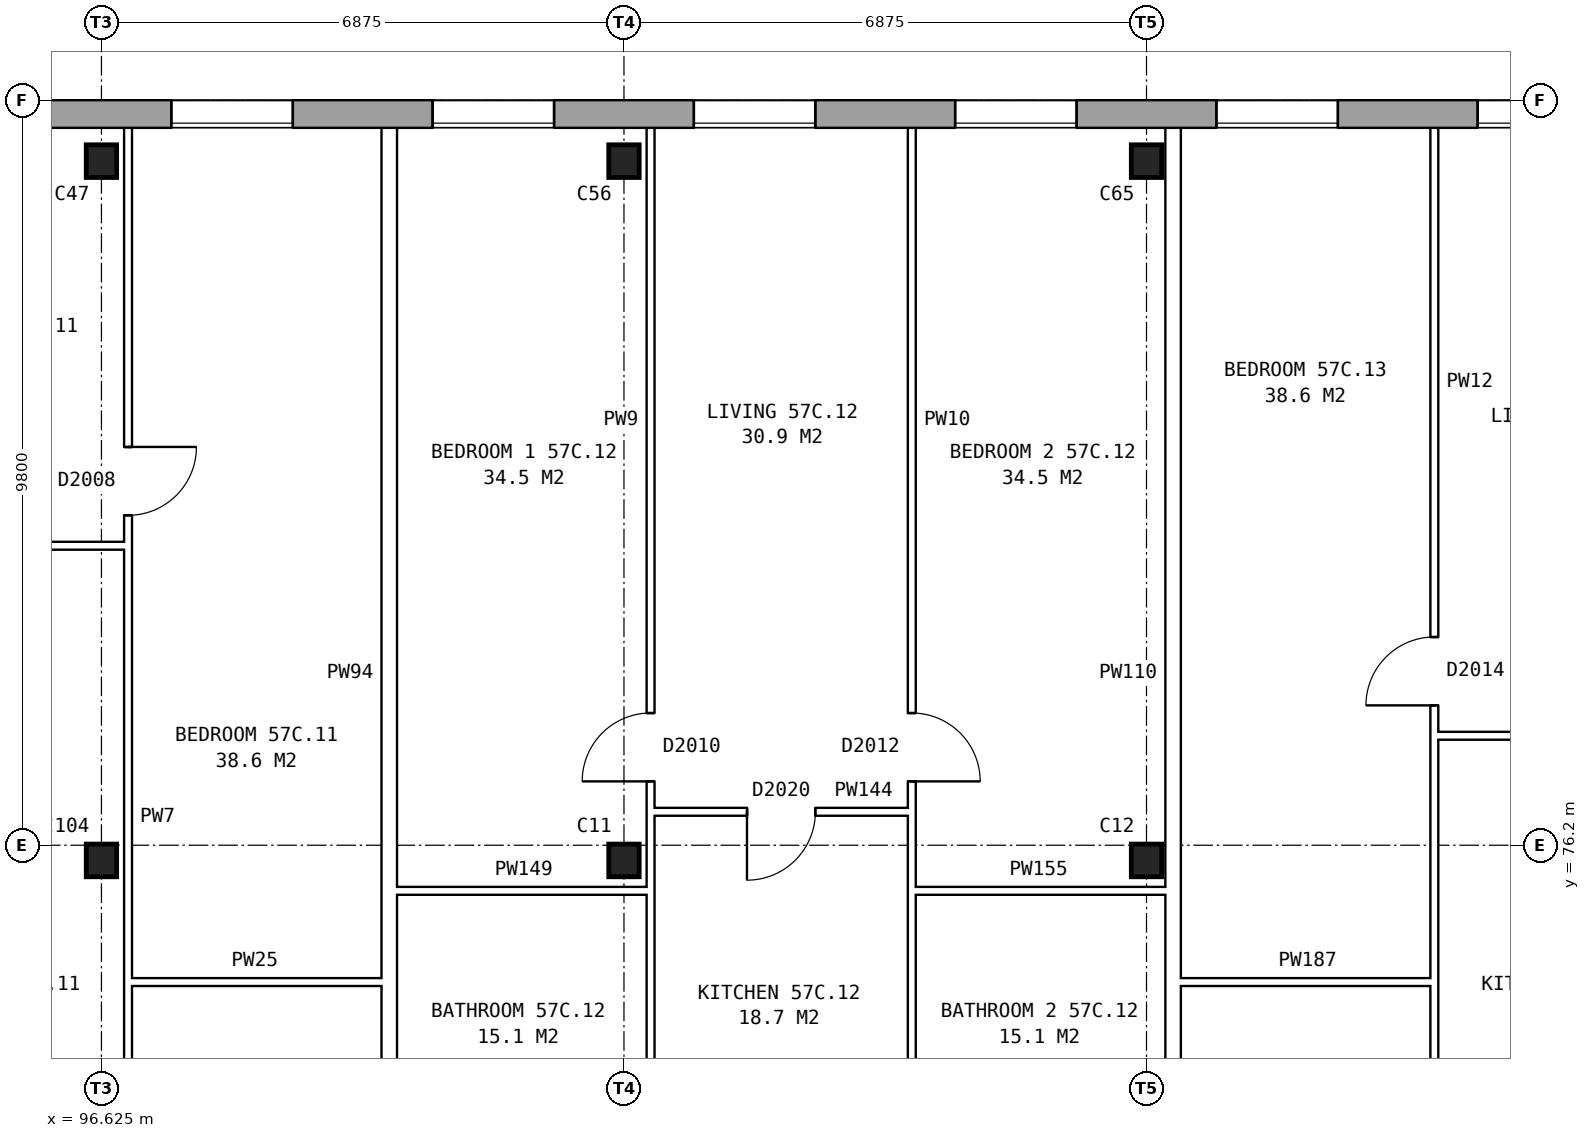
"""IFC4 building model, lengths in metres.
Left out: names, types, materials, properties, quantities, classifications, styles, units other than length and angle.
Written with IfcOpenShell. Run it as: python <this file> out.ifc"""

import sys

from ifc_helpers import new_model, si_unit, direction, frame, frame_2d, origin, origin_2d, place, context, subcontext, project, spatial, rectangle, i_section, extrude, element, fill, save


model = new_model("IFC4")
c1 = context("Model", 3, precision=1e-05, world=origin(), true_north=direction((0.0, 1.0)))
c2 = subcontext(c1, "Body", "Model", "MODEL_VIEW")
j1 = project(units=[si_unit("LENGTHUNIT", "METRE"), si_unit("PLANEANGLEUNIT", "RADIAN")], contexts=[c1])
p1 = place(None, origin())
s1 = spatial("IfcSite", under=j1, at=p1, CompositionType="ELEMENT")
p2 = place(p1, origin())
s2 = spatial("IfcBuilding", under=s1, at=p2, CompositionType="ELEMENT")
p3 = place(p2, frame((0.0, 0.0, 202.8)))
s3 = spatial("IfcBuildingStorey", under=s2, at=p3, CompositionType="ELEMENT", Elevation=202.8)
for number, where, z_axis, x_axis in (
    (1, (96.625, 76.0, 0.0), (0.0, 0.0, 1.0), (1.0, 0.0, 0.0)),
    (2, (103.5, 76.0, 0.0), (0.0, 0.0, 1.0), (1.0, 0.0, 0.0)),
    (3, (110.375, 76.0, 0.0), (0.0, 0.0, 1.0), (1.0, 0.0, 0.0)),
    (4, (96.625, 85.2, 0.0), (0.0, 0.0, 1.0), (1.0, 0.0, 0.0)),
    (5, (103.5, 85.2, 0.0), (0.0, 0.0, 1.0), (1.0, 0.0, 0.0)),
    (6, (110.375, 85.2, 0.0), (0.0, 0.0, 1.0), (1.0, 0.0, 0.0)),
):
    element("IfcColumn", number, at=place(p3, frame(where, z_axis=z_axis, x_axis=x_axis)), inside=s3, PredefinedType="COLUMN", context=c2, shape_type="SweptSolid", body=[
        extrude(i_section(OverallWidth=0.4, OverallDepth=0.43, WebThickness=0.04, FlangeThickness=0.04, at=origin_2d()), origin(), (0.0, 0.0, 1.0), 2.85),
    ])
p4 = place(p3, frame((131.05, 85.82, 0.0), z_axis=(0.0, 0.0, 1.0), x_axis=(-1.0, 0.0, 0.0)))
e7 = element("IfcWall", 7, at=p4, inside=s3, PredefinedType="STANDARD", context=c2, shape_type="SweptSolid", body=[
    extrude(rectangle(XDim=55.1, YDim=0.36, at=frame_2d((27.55, 0.0))), origin(), (0.0, 0.0, 1.0), 2.85),
])
p5 = place(p4, frame((0.969, 0.0, 0.8)))
e8 = element("IfcOpeningElement", 8, at=p5, cuts=e7, PredefinedType="OPENING", context=c2, shape_type="SweptSolid", body=[
    extrude(rectangle(XDim=1.6, YDim=1.8, at=frame_2d((0.8, 0.9))), frame((0.0, 0.19, 0.0), z_axis=(0.0, -1.0, 0.0), x_axis=(1.0, 0.0, 0.0)), (0.0, 0.0, 1.0), 0.38),
])
p6 = place(p4, frame((4.406, 0.0, 0.8)))
e9 = element("IfcOpeningElement", 9, at=p6, cuts=e7, PredefinedType="OPENING", context=c2, shape_type="SweptSolid", body=[
    extrude(rectangle(XDim=1.6, YDim=1.8, at=frame_2d((0.8, 0.9))), frame((0.0, 0.19, 0.0), z_axis=(0.0, -1.0, 0.0), x_axis=(1.0, 0.0, 0.0)), (0.0, 0.0, 1.0), 0.38),
])
p7 = place(p4, frame((7.844, 0.0, 0.8)))
e10 = element("IfcOpeningElement", 10, at=p7, cuts=e7, PredefinedType="OPENING", context=c2, shape_type="SweptSolid", body=[
    extrude(rectangle(XDim=1.6, YDim=1.8, at=frame_2d((0.8, 0.9))), frame((0.0, 0.19, 0.0), z_axis=(0.0, -1.0, 0.0), x_axis=(1.0, 0.0, 0.0)), (0.0, 0.0, 1.0), 0.38),
])
p8 = place(p4, frame((11.281, 0.0, 0.8)))
e11 = element("IfcOpeningElement", 11, at=p8, cuts=e7, PredefinedType="OPENING", context=c2, shape_type="SweptSolid", body=[
    extrude(rectangle(XDim=1.6, YDim=1.8, at=frame_2d((0.8, 0.9))), frame((0.0, 0.19, 0.0), z_axis=(0.0, -1.0, 0.0), x_axis=(1.0, 0.0, 0.0)), (0.0, 0.0, 1.0), 0.38),
])
p9 = place(p4, frame((14.719, 0.0, 0.8)))
e12 = element("IfcOpeningElement", 12, at=p9, cuts=e7, PredefinedType="OPENING", context=c2, shape_type="SweptSolid", body=[
    extrude(rectangle(XDim=1.6, YDim=1.8, at=frame_2d((0.8, 0.9))), frame((0.0, 0.19, 0.0), z_axis=(0.0, -1.0, 0.0), x_axis=(1.0, 0.0, 0.0)), (0.0, 0.0, 1.0), 0.38),
])
p10 = place(p4, frame((18.156, 0.0, 0.8)))
e13 = element("IfcOpeningElement", 13, at=p10, cuts=e7, PredefinedType="OPENING", context=c2, shape_type="SweptSolid", body=[
    extrude(rectangle(XDim=1.6, YDim=1.8, at=frame_2d((0.8, 0.9))), frame((0.0, 0.19, 0.0), z_axis=(0.0, -1.0, 0.0), x_axis=(1.0, 0.0, 0.0)), (0.0, 0.0, 1.0), 0.38),
])
p11 = place(p4, frame((21.594, 0.0, 0.8)))
e14 = element("IfcOpeningElement", 14, at=p11, cuts=e7, PredefinedType="OPENING", context=c2, shape_type="SweptSolid", body=[
    extrude(rectangle(XDim=1.6, YDim=1.8, at=frame_2d((0.8, 0.9))), frame((0.0, 0.19, 0.0), z_axis=(0.0, -1.0, 0.0), x_axis=(1.0, 0.0, 0.0)), (0.0, 0.0, 1.0), 0.38),
])
p12 = place(p4, frame((25.031, 0.0, 0.8)))
e15 = element("IfcOpeningElement", 15, at=p12, cuts=e7, PredefinedType="OPENING", context=c2, shape_type="SweptSolid", body=[
    extrude(rectangle(XDim=1.6, YDim=1.8, at=frame_2d((0.8, 0.9))), frame((0.0, 0.19, 0.0), z_axis=(0.0, -1.0, 0.0), x_axis=(1.0, 0.0, 0.0)), (0.0, 0.0, 1.0), 0.38),
])
p13 = place(p4, frame((28.469, 0.0, 0.8)))
e16 = element("IfcOpeningElement", 16, at=p13, cuts=e7, PredefinedType="OPENING", context=c2, shape_type="SweptSolid", body=[
    extrude(rectangle(XDim=1.6, YDim=1.8, at=frame_2d((0.8, 0.9))), frame((0.0, 0.19, 0.0), z_axis=(0.0, -1.0, 0.0), x_axis=(1.0, 0.0, 0.0)), (0.0, 0.0, 1.0), 0.38),
])
p14 = place(p4, frame((31.906, 0.0, 0.8)))
e17 = element("IfcOpeningElement", 17, at=p14, cuts=e7, PredefinedType="OPENING", context=c2, shape_type="SweptSolid", body=[
    extrude(rectangle(XDim=1.6, YDim=1.8, at=frame_2d((0.8, 0.9))), frame((0.0, 0.19, 0.0), z_axis=(0.0, -1.0, 0.0), x_axis=(1.0, 0.0, 0.0)), (0.0, 0.0, 1.0), 0.38),
])
p15 = place(p4, frame((35.344, 0.0, 0.8)))
e18 = element("IfcOpeningElement", 18, at=p15, cuts=e7, PredefinedType="OPENING", context=c2, shape_type="SweptSolid", body=[
    extrude(rectangle(XDim=1.6, YDim=1.8, at=frame_2d((0.8, 0.9))), frame((0.0, 0.19, 0.0), z_axis=(0.0, -1.0, 0.0), x_axis=(1.0, 0.0, 0.0)), (0.0, 0.0, 1.0), 0.38),
])
p16 = place(p4, frame((38.781, 0.0, 0.8)))
e19 = element("IfcOpeningElement", 19, at=p16, cuts=e7, PredefinedType="OPENING", context=c2, shape_type="SweptSolid", body=[
    extrude(rectangle(XDim=1.6, YDim=1.8, at=frame_2d((0.8, 0.9))), frame((0.0, 0.19, 0.0), z_axis=(0.0, -1.0, 0.0), x_axis=(1.0, 0.0, 0.0)), (0.0, 0.0, 1.0), 0.38),
])
p17 = place(p4, frame((42.219, 0.0, 0.8)))
e20 = element("IfcOpeningElement", 20, at=p17, cuts=e7, PredefinedType="OPENING", context=c2, shape_type="SweptSolid", body=[
    extrude(rectangle(XDim=1.6, YDim=1.8, at=frame_2d((0.8, 0.9))), frame((0.0, 0.19, 0.0), z_axis=(0.0, -1.0, 0.0), x_axis=(1.0, 0.0, 0.0)), (0.0, 0.0, 1.0), 0.38),
])
p18 = place(p4, frame((45.656, 0.0, 0.8)))
e21 = element("IfcOpeningElement", 21, at=p18, cuts=e7, PredefinedType="OPENING", context=c2, shape_type="SweptSolid", body=[
    extrude(rectangle(XDim=1.6, YDim=1.8, at=frame_2d((0.8, 0.9))), frame((0.0, 0.19, 0.0), z_axis=(0.0, -1.0, 0.0), x_axis=(1.0, 0.0, 0.0)), (0.0, 0.0, 1.0), 0.38),
])
p19 = place(p4, frame((49.094, 0.0, 0.8)))
e22 = element("IfcOpeningElement", 22, at=p19, cuts=e7, PredefinedType="OPENING", context=c2, shape_type="SweptSolid", body=[
    extrude(rectangle(XDim=1.6, YDim=1.8, at=frame_2d((0.8, 0.9))), frame((0.0, 0.19, 0.0), z_axis=(0.0, -1.0, 0.0), x_axis=(1.0, 0.0, 0.0)), (0.0, 0.0, 1.0), 0.38),
])
p20 = place(p4, frame((52.531, 0.0, 0.8)))
e23 = element("IfcOpeningElement", 23, at=p20, cuts=e7, PredefinedType="OPENING", context=c2, shape_type="SweptSolid", body=[
    extrude(rectangle(XDim=1.6, YDim=1.8, at=frame_2d((0.8, 0.9))), frame((0.0, 0.19, 0.0), z_axis=(0.0, -1.0, 0.0), x_axis=(1.0, 0.0, 0.0)), (0.0, 0.0, 1.0), 0.38),
])
p21 = place(p3, frame((96.975, 74.4, 0.0), z_axis=(0.0, 0.0, 1.0), x_axis=(1.0, 0.0, 0.0)))
e24 = element("IfcWall", 24, at=p21, inside=s3, PredefinedType="PARTITIONING", context=c2, shape_type="SweptSolid", body=[
    extrude(rectangle(XDim=3.337, YDim=0.1, at=frame_2d((1.668, 0.0))), origin(), (0.0, 0.0, 1.0), 2.85),
])
p22 = place(p3, frame((110.825, 74.4, 0.0), z_axis=(0.0, 0.0, 1.0), x_axis=(1.0, 0.0, 0.0)))
e25 = element("IfcWall", 25, at=p22, inside=s3, PredefinedType="PARTITIONING", context=c2, shape_type="SweptSolid", body=[
    extrude(rectangle(XDim=3.337, YDim=0.1, at=frame_2d((1.668, 0.0))), origin(), (0.0, 0.0, 1.0), 2.85),
])
p23 = place(p3, frame((100.512, 75.6, 0.0), z_axis=(0.0, 0.0, 1.0), x_axis=(1.0, 0.0, 0.0)))
e26 = element("IfcWall", 26, at=p23, inside=s3, PredefinedType="PARTITIONING", context=c2, shape_type="SweptSolid", body=[
    extrude(rectangle(XDim=3.338, YDim=0.1, at=frame_2d((1.669, 0.0))), origin(), (0.0, 0.0, 1.0), 2.85),
])
p24 = place(p3, frame((107.287, 75.6, 0.0), z_axis=(0.0, 0.0, 1.0), x_axis=(1.0, 0.0, 0.0)))
e27 = element("IfcWall", 27, at=p24, inside=s3, PredefinedType="PARTITIONING", context=c2, shape_type="SweptSolid", body=[
    extrude(rectangle(XDim=3.338, YDim=0.1, at=frame_2d((1.669, 0.0))), origin(), (0.0, 0.0, 1.0), 2.85),
])
p25 = place(p3, frame((103.85, 76.64, 0.0), z_axis=(0.0, 0.0, 1.0), x_axis=(1.0, 0.0, 0.0)))
e28 = element("IfcWall", 28, at=p25, inside=s3, PredefinedType="PARTITIONING", context=c2, shape_type="SweptSolid", body=[
    extrude(rectangle(XDim=3.437, YDim=0.1, at=frame_2d((1.719, 0.0))), origin(), (0.0, 0.0, 1.0), 2.85),
])
p26 = place(p25, frame((1.269, 0.0, 0.0)))
e29 = element("IfcOpeningElement", 29, at=p26, cuts=e28, PredefinedType="OPENING", context=c2, shape_type="SweptSolid", body=[
    extrude(rectangle(XDim=0.9, YDim=2.1, at=frame_2d((0.45, 1.05))), frame((0.0, 0.06, 0.0), z_axis=(0.0, -1.0, 0.0), x_axis=(1.0, 0.0, 0.0)), (0.0, 0.0, 1.0), 0.12),
])
p27 = place(p3, frame((114.162, 77.64, 0.0), z_axis=(0.0, 0.0, 1.0), x_axis=(1.0, 0.0, 0.0)))
e30 = element("IfcWall", 30, at=p27, inside=s3, PredefinedType="PARTITIONING", context=c2, shape_type="SweptSolid", body=[
    extrude(rectangle(XDim=6.875, YDim=0.1, at=frame_2d((3.438, 0.0))), origin(), (0.0, 0.0, 1.0), 2.85),
])
p28 = place(p27, frame((1.269, 0.0, 0.0)))
e31 = element("IfcOpeningElement", 31, at=p28, cuts=e30, PredefinedType="OPENING", context=c2, shape_type="SweptSolid", body=[
    extrude(rectangle(XDim=0.9, YDim=2.1, at=frame_2d((0.45, 1.05))), frame((0.0, 0.06, 0.0), z_axis=(0.0, -1.0, 0.0), x_axis=(1.0, 0.0, 0.0)), (0.0, 0.0, 1.0), 0.12),
])
p29 = place(p27, frame((4.707, 0.0, 0.0)))
e32 = element("IfcOpeningElement", 32, at=p29, cuts=e30, PredefinedType="OPENING", context=c2, shape_type="SweptSolid", body=[
    extrude(rectangle(XDim=0.9, YDim=2.1, at=frame_2d((0.45, 1.05))), frame((0.0, 0.06, 0.0), z_axis=(0.0, -1.0, 0.0), x_axis=(1.0, 0.0, 0.0)), (0.0, 0.0, 1.0), 0.12),
])
p30 = place(p3, frame((93.637, 80.14, 0.0), z_axis=(0.0, 0.0, 1.0), x_axis=(1.0, 0.0, 0.0)))
e33 = element("IfcWall", 33, at=p30, inside=s3, PredefinedType="PARTITIONING", context=c2, shape_type="SweptSolid", body=[
    extrude(rectangle(XDim=3.338, YDim=0.1, at=frame_2d((1.669, 0.0))), origin(), (0.0, 0.0, 1.0), 2.85),
])
p31 = place(p30, frame((1.219, 0.0, 0.0)))
e34 = element("IfcOpeningElement", 34, at=p31, cuts=e33, PredefinedType="OPENING", context=c2, shape_type="SweptSolid", body=[
    extrude(rectangle(XDim=0.9, YDim=2.1, at=frame_2d((0.45, 1.05))), frame((0.0, 0.06, 0.0), z_axis=(0.0, -1.0, 0.0), x_axis=(1.0, 0.0, 0.0)), (0.0, 0.0, 1.0), 0.12),
])
p32 = place(p3, frame((96.975, 71.3, 0.0), z_axis=(0.0, 0.0, 1.0), x_axis=(0.0, 1.0, 0.0)))
e35 = element("IfcWall", 35, at=p32, inside=s3, PredefinedType="PARTITIONING", context=c2, shape_type="SweptSolid", body=[
    extrude(rectangle(XDim=14.34, YDim=0.1, at=frame_2d((7.17, 0.0))), origin(), (0.0, 0.0, 1.0), 2.85),
])
p33 = place(p32, frame((9.24, 0.0, 0.0)))
e36 = element("IfcOpeningElement", 36, at=p33, cuts=e35, PredefinedType="OPENING", context=c2, shape_type="SweptSolid", body=[
    extrude(rectangle(XDim=0.9, YDim=2.1, at=frame_2d((0.45, 1.05))), frame((0.0, 0.06, 0.0), z_axis=(0.0, -1.0, 0.0), x_axis=(1.0, 0.0, 0.0)), (0.0, 0.0, 1.0), 0.12),
])
p34 = place(p32, frame((0.4, 0.0, 0.0)))
e37 = element("IfcOpeningElement", 37, at=p34, cuts=e35, PredefinedType="OPENING", context=c2, shape_type="SweptSolid", body=[
    extrude(rectangle(XDim=0.9, YDim=2.1, at=frame_2d((0.45, 1.05))), frame((0.0, 0.06, 0.0), z_axis=(0.0, -1.0, 0.0), x_axis=(1.0, 0.0, 0.0)), (0.0, 0.0, 1.0), 0.12),
])
p35 = place(p3, frame((100.412, 71.3, 0.0), z_axis=(0.0, 0.0, 1.0), x_axis=(0.0, 1.0, 0.0)))
e38 = element("IfcWall", 38, at=p35, inside=s3, PredefinedType="PARTITIONING", context=c2, shape_type="SweptSolid", body=[
    extrude(rectangle(XDim=14.34, YDim=0.2, at=frame_2d((7.17, 0.0))), origin(), (0.0, 0.0, 1.0), 2.85),
])
p36 = place(p3, frame((103.85, 71.3, 0.0), z_axis=(0.0, 0.0, 1.0), x_axis=(0.0, 1.0, 0.0)))
e39 = element("IfcWall", 39, at=p36, inside=s3, PredefinedType="PARTITIONING", context=c2, shape_type="SweptSolid", body=[
    extrude(rectangle(XDim=14.34, YDim=0.1, at=frame_2d((7.17, 0.0))), origin(), (0.0, 0.0, 1.0), 2.85),
])
p37 = place(p36, frame((5.74, 0.0, 0.0)))
e40 = element("IfcOpeningElement", 40, at=p37, cuts=e39, PredefinedType="OPENING", context=c2, shape_type="SweptSolid", body=[
    extrude(rectangle(XDim=0.9, YDim=2.1, at=frame_2d((0.45, 1.05))), frame((0.0, 0.06, 0.0), z_axis=(0.0, -1.0, 0.0), x_axis=(1.0, 0.0, 0.0)), (0.0, 0.0, 1.0), 0.12),
])
p38 = place(p36, frame((0.4, 0.0, 0.0)))
e41 = element("IfcOpeningElement", 41, at=p38, cuts=e39, PredefinedType="OPENING", context=c2, shape_type="SweptSolid", body=[
    extrude(rectangle(XDim=0.9, YDim=2.1, at=frame_2d((0.45, 1.05))), frame((0.0, 0.06, 0.0), z_axis=(0.0, -1.0, 0.0), x_axis=(1.0, 0.0, 0.0)), (0.0, 0.0, 1.0), 0.12),
])
p39 = place(p3, frame((107.287, 71.3, 0.0), z_axis=(0.0, 0.0, 1.0), x_axis=(0.0, 1.0, 0.0)))
e42 = element("IfcWall", 42, at=p39, inside=s3, PredefinedType="PARTITIONING", context=c2, shape_type="SweptSolid", body=[
    extrude(rectangle(XDim=14.34, YDim=0.1, at=frame_2d((7.17, 0.0))), origin(), (0.0, 0.0, 1.0), 2.85),
])
p40 = place(p39, frame((5.74, 0.0, 0.0)))
e43 = element("IfcOpeningElement", 43, at=p40, cuts=e42, PredefinedType="OPENING", context=c2, shape_type="SweptSolid", body=[
    extrude(rectangle(XDim=0.9, YDim=2.1, at=frame_2d((0.45, 1.05))), frame((0.0, 0.06, 0.0), z_axis=(0.0, -1.0, 0.0), x_axis=(1.0, 0.0, 0.0)), (0.0, 0.0, 1.0), 0.12),
])
p41 = place(p39, frame((0.4, 0.0, 0.0)))
e44 = element("IfcOpeningElement", 44, at=p41, cuts=e42, PredefinedType="OPENING", context=c2, shape_type="SweptSolid", body=[
    extrude(rectangle(XDim=0.9, YDim=2.1, at=frame_2d((0.45, 1.05))), frame((0.0, 0.06, 0.0), z_axis=(0.0, -1.0, 0.0), x_axis=(1.0, 0.0, 0.0)), (0.0, 0.0, 1.0), 0.12),
])
p42 = place(p3, frame((110.725, 71.3, 0.0), z_axis=(0.0, 0.0, 1.0), x_axis=(0.0, 1.0, 0.0)))
e45 = element("IfcWall", 45, at=p42, inside=s3, PredefinedType="PARTITIONING", context=c2, shape_type="SweptSolid", body=[
    extrude(rectangle(XDim=14.34, YDim=0.2, at=frame_2d((7.17, 0.0))), origin(), (0.0, 0.0, 1.0), 2.85),
])
p43 = place(p3, frame((114.162, 71.3, 0.0), z_axis=(0.0, 0.0, 1.0), x_axis=(0.0, 1.0, 0.0)))
e46 = element("IfcWall", 46, at=p43, inside=s3, PredefinedType="PARTITIONING", context=c2, shape_type="SweptSolid", body=[
    extrude(rectangle(XDim=14.34, YDim=0.1, at=frame_2d((7.17, 0.0))), origin(), (0.0, 0.0, 1.0), 2.85),
])
p44 = place(p43, frame((6.74, 0.0, 0.0)))
e47 = element("IfcOpeningElement", 47, at=p44, cuts=e46, PredefinedType="OPENING", context=c2, shape_type="SweptSolid", body=[
    extrude(rectangle(XDim=0.9, YDim=2.1, at=frame_2d((0.45, 1.05))), frame((0.0, 0.06, 0.0), z_axis=(0.0, -1.0, 0.0), x_axis=(1.0, 0.0, 0.0)), (0.0, 0.0, 1.0), 0.12),
])
p45 = place(p43, frame((0.4, 0.0, 0.0)))
e48 = element("IfcOpeningElement", 48, at=p45, cuts=e46, PredefinedType="OPENING", context=c2, shape_type="SweptSolid", body=[
    extrude(rectangle(XDim=0.9, YDim=2.1, at=frame_2d((0.45, 1.05))), frame((0.0, 0.06, 0.0), z_axis=(0.0, -1.0, 0.0), x_axis=(1.0, 0.0, 0.0)), (0.0, 0.0, 1.0), 0.12),
])
p46 = place(p9, origin())
e49 = element("IfcWindow", 49, at=p46, inside=s3, PartitioningType="SINGLE_PANEL", PredefinedType="WINDOW", context=c2, shape_type="SweptSolid", body=[
    extrude(rectangle(XDim=1.6, YDim=1.8, at=frame_2d((0.8, 0.9))), frame((0.0, 0.15, 0.0), z_axis=(0.0, -1.0, 0.0), x_axis=(1.0, 0.0, 0.0)), (0.0, 0.0, 1.0), 0.06),
])
fill(e12, e49)
p47 = place(p10, origin())
e50 = element("IfcWindow", 50, at=p47, inside=s3, PartitioningType="SINGLE_PANEL", PredefinedType="WINDOW", context=c2, shape_type="SweptSolid", body=[
    extrude(rectangle(XDim=1.6, YDim=1.8, at=frame_2d((0.8, 0.9))), frame((0.0, 0.15, 0.0), z_axis=(0.0, -1.0, 0.0), x_axis=(1.0, 0.0, 0.0)), (0.0, 0.0, 1.0), 0.06),
])
fill(e13, e50)
p48 = place(p11, origin())
e51 = element("IfcWindow", 51, at=p48, inside=s3, PartitioningType="SINGLE_PANEL", PredefinedType="WINDOW", context=c2, shape_type="SweptSolid", body=[
    extrude(rectangle(XDim=1.6, YDim=1.8, at=frame_2d((0.8, 0.9))), frame((0.0, 0.15, 0.0), z_axis=(0.0, -1.0, 0.0), x_axis=(1.0, 0.0, 0.0)), (0.0, 0.0, 1.0), 0.06),
])
fill(e14, e51)
p49 = place(p12, origin())
e52 = element("IfcWindow", 52, at=p49, inside=s3, PartitioningType="SINGLE_PANEL", PredefinedType="WINDOW", context=c2, shape_type="SweptSolid", body=[
    extrude(rectangle(XDim=1.6, YDim=1.8, at=frame_2d((0.8, 0.9))), frame((0.0, 0.15, 0.0), z_axis=(0.0, -1.0, 0.0), x_axis=(1.0, 0.0, 0.0)), (0.0, 0.0, 1.0), 0.06),
])
fill(e15, e52)
p50 = place(p13, origin())
e53 = element("IfcWindow", 53, at=p50, inside=s3, PartitioningType="SINGLE_PANEL", PredefinedType="WINDOW", context=c2, shape_type="SweptSolid", body=[
    extrude(rectangle(XDim=1.6, YDim=1.8, at=frame_2d((0.8, 0.9))), frame((0.0, 0.15, 0.0), z_axis=(0.0, -1.0, 0.0), x_axis=(1.0, 0.0, 0.0)), (0.0, 0.0, 1.0), 0.06),
])
fill(e16, e53)
p51 = place(p14, origin())
e54 = element("IfcWindow", 54, at=p51, inside=s3, PartitioningType="SINGLE_PANEL", PredefinedType="WINDOW", context=c2, shape_type="SweptSolid", body=[
    extrude(rectangle(XDim=1.6, YDim=1.8, at=frame_2d((0.8, 0.9))), frame((0.0, 0.15, 0.0), z_axis=(0.0, -1.0, 0.0), x_axis=(1.0, 0.0, 0.0)), (0.0, 0.0, 1.0), 0.06),
])
fill(e17, e54)
p52 = place(p33, frame((0.9, 0.0, 0.0), z_axis=(0.0, 0.0, 1.0), x_axis=(-1.0, 0.0, 0.0)))
e55 = element("IfcDoor", 55, at=p52, inside=s3, OperationType="SINGLE_SWING_LEFT", PredefinedType="DOOR", context=c2, shape_type="SweptSolid", body=[
    extrude(rectangle(XDim=0.9, YDim=2.1, at=frame_2d((0.45, 1.05))), frame((0.0, 0.025, 0.0), z_axis=(0.0, -1.0, 0.0), x_axis=(1.0, 0.0, 0.0)), (0.0, 0.0, 1.0), 0.05),
])
fill(e36, e55)
p53 = place(p37, origin())
e56 = element("IfcDoor", 56, at=p53, inside=s3, OperationType="SINGLE_SWING_LEFT", PredefinedType="DOOR", context=c2, shape_type="SweptSolid", body=[
    extrude(rectangle(XDim=0.9, YDim=2.1, at=frame_2d((0.45, 1.05))), frame((0.0, 0.025, 0.0), z_axis=(0.0, -1.0, 0.0), x_axis=(1.0, 0.0, 0.0)), (0.0, 0.0, 1.0), 0.05),
])
fill(e40, e56)
p54 = place(p40, frame((0.9, 0.0, 0.0), z_axis=(0.0, 0.0, 1.0), x_axis=(-1.0, 0.0, 0.0)))
e57 = element("IfcDoor", 57, at=p54, inside=s3, OperationType="SINGLE_SWING_RIGHT", PredefinedType="DOOR", context=c2, shape_type="SweptSolid", body=[
    extrude(rectangle(XDim=0.9, YDim=2.1, at=frame_2d((0.45, 1.05))), frame((0.0, 0.025, 0.0), z_axis=(0.0, -1.0, 0.0), x_axis=(1.0, 0.0, 0.0)), (0.0, 0.0, 1.0), 0.05),
])
fill(e43, e57)
p55 = place(p26, frame((0.9, 0.0, 0.0), z_axis=(0.0, 0.0, 1.0), x_axis=(-1.0, 0.0, 0.0)))
e58 = element("IfcDoor", 58, at=p55, inside=s3, OperationType="SINGLE_SWING_RIGHT", PredefinedType="DOOR", context=c2, shape_type="SweptSolid", body=[
    extrude(rectangle(XDim=0.9, YDim=2.1, at=frame_2d((0.45, 1.05))), frame((0.0, 0.025, 0.0), z_axis=(0.0, -1.0, 0.0), x_axis=(1.0, 0.0, 0.0)), (0.0, 0.0, 1.0), 0.05),
])
fill(e29, e58)
p56 = place(p44, origin())
e59 = element("IfcDoor", 59, at=p56, inside=s3, OperationType="SINGLE_SWING_LEFT", PredefinedType="DOOR", context=c2, shape_type="SweptSolid", body=[
    extrude(rectangle(XDim=0.9, YDim=2.1, at=frame_2d((0.45, 1.05))), frame((0.0, 0.025, 0.0), z_axis=(0.0, -1.0, 0.0), x_axis=(1.0, 0.0, 0.0)), (0.0, 0.0, 1.0), 0.05),
])
fill(e47, e59)
save(model, sys.argv[1])
